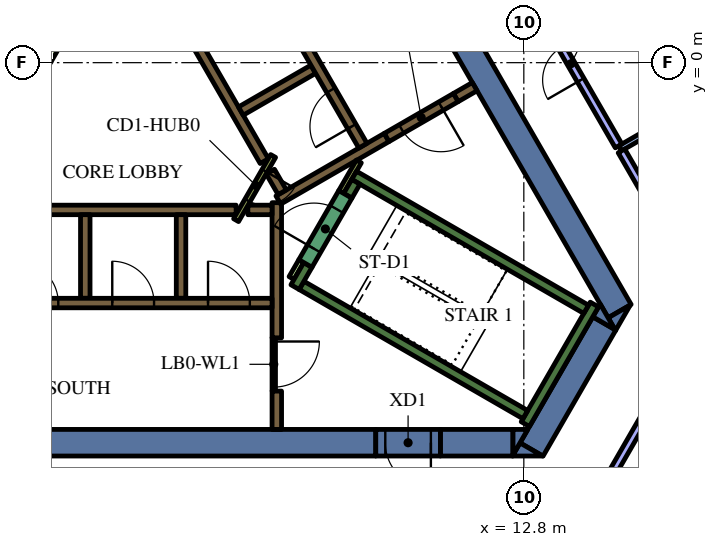
"""IFC4 building model, lengths in metres.
Left out: names, types, materials, properties, quantities, classifications, styles, units other than length and angle.
Written with IfcOpenShell. Run it as: python <this file> out.ifc"""

import sys

from ifc_helpers import new_model, si_unit, direction, frame, frame_2d, origin, place, context, subcontext, project, spatial, polyline, rectangle, outline, extrude, element, fill, save


model = new_model("IFC4")
c1 = context("Model", 3, precision=1e-05, world=origin(), true_north=direction((0.0, 1.0)))
c2 = subcontext(c1, "Body", "Model", "MODEL_VIEW")
j1 = project(units=[si_unit("LENGTHUNIT", "METRE"), si_unit("PLANEANGLEUNIT", "RADIAN")], contexts=[c1])
p1 = place(None, origin())
s1 = spatial("IfcSite", under=j1, at=p1, CompositionType="ELEMENT")
p2 = place(p1, origin())
s2 = spatial("IfcBuilding", under=s1, at=p2, CompositionType="ELEMENT")
p3 = place(p2, frame((0.0, 0.0, 226.8)))
s3 = spatial("IfcBuildingStorey", under=s2, at=p3, CompositionType="ELEMENT", Elevation=226.8)
p4 = place(p3, frame((9.085, 4.264, 0.0), z_axis=(0.0, 0.0, 1.0), x_axis=(0.499998082512, -0.866026510844, 0.0)))
e1 = element("IfcWall", 1, at=p4, inside=s3, PredefinedType="SOLIDWALL", context=c2, shape_type="SweptSolid", body=[
    extrude(rectangle(XDim=12.472, YDim=0.7, at=frame_2d((6.236, 0.0))), origin(), (0.0, 0.0, 1.0), 4.2),
])
p5 = place(p3, origin())
e2 = element("IfcWall", 2, at=p5, inside=s3, PredefinedType="SOLIDWALL", context=c2, shape_type="SweptSolid", body=[
    extrude(outline(polyline([(15.213, -7.05), (15.019, -6.714), (15.601, -6.378), (15.213, -7.05)])), origin(), (0.0, 0.0, 1.0), 4.2),
])
p6 = place(p3, frame((13.003, -10.179, 0.0), z_axis=(0.0, 0.0, 1.0), x_axis=(0.499972675833, 0.866041178825, 0.0)))
e3 = element("IfcWall", 3, at=p6, inside=s3, PredefinedType="SOLIDWALL", context=c2, shape_type="SweptSolid", body=[
    extrude(rectangle(XDim=3.829, YDim=0.7, at=frame_2d((1.915, 0.0))), origin(), (0.0, 0.0, 1.0), 4.2),
])
e4 = element("IfcWall", 4, at=p5, inside=s3, PredefinedType="SOLIDWALL", context=c2, shape_type="SweptSolid", body=[
    extrude(outline(polyline([(12.698, -10.005), (13.296, -10.35), (12.5, -10.35), (12.698, -10.005)])), origin(), (0.0, 0.0, 1.0), 4.2),
])
e5 = element("IfcWall", 5, at=p5, inside=s3, PredefinedType="SOLIDWALL", context=c2, shape_type="SweptSolid", body=[
    extrude(outline(polyline([(14.809, -6.35), (15.197, -7.022), (14.615, -6.686), (14.809, -6.35)])), origin(), (0.0, 0.0, 1.0), 4.2),
])
p7 = place(p3, frame((10.604, -10.0, 0.0), z_axis=(0.0, 0.0, 1.0), x_axis=(1.0, 0.0, 0.0)))
e6 = element("IfcWall", 6, at=p7, inside=s3, PredefinedType="SOLIDWALL", context=c2, shape_type="SweptSolid", body=[
    extrude(rectangle(XDim=1.909, YDim=0.7, at=frame_2d((0.955, 0.0))), origin(), (0.0, 0.0, 1.0), 4.2),
])
e7 = element("IfcWall", 7, at=p5, inside=s3, PredefinedType="SOLIDWALL", context=c2, shape_type="SweptSolid", body=[
    extrude(outline(polyline([(12.904, -9.65), (12.516, -10.322), (12.516, -9.65), (12.904, -9.65)])), origin(), (0.0, 0.0, 1.0), 4.2),
])
p8 = place(p3, frame((8.904, -10.0, 0.0), z_axis=(0.0, 0.0, 1.0), x_axis=(-1.0, 0.0, 0.0)))
e8 = element("IfcWall", 8, at=p8, inside=s3, PredefinedType="SOLIDWALL", context=c2, shape_type="SweptSolid", body=[
    extrude(rectangle(XDim=22.226, YDim=0.7, at=frame_2d((11.113, 0.0))), origin(), (0.0, 0.0, 1.0), 4.2),
])
p9 = place(p3, frame((12.84, -9.511, 0.0), z_axis=(0.0, 0.0, 1.0), x_axis=(0.500048121057, 0.865997619297, 0.0)))
e9 = element("IfcWall", 9, at=p9, inside=s3, PredefinedType="SOLIDWALL", context=c2, shape_type="SweptSolid", body=[
    extrude(rectangle(XDim=3.634, YDim=0.25, at=frame_2d((1.817, 0.0))), origin(), (0.0, 0.0, 1.0), 4.2),
])
p10 = place(p3, frame((12.84, -9.261, 0.0), z_axis=(0.0, 0.0, 1.0), x_axis=(-0.866013990052, 0.500019768644, 0.0)))
e10 = element("IfcWall", 10, at=p10, inside=s3, PredefinedType="SOLIDWALL", context=c2, shape_type="SweptSolid", body=[
    extrude(rectangle(XDim=6.8, YDim=0.25, at=frame_2d((3.4, 0.0))), origin(), (0.0, 0.0, 1.0), 4.2),
])
p11 = place(p3, frame((6.78, -5.906, 0.0), z_axis=(0.0, 0.0, 1.0), x_axis=(0.500223362819, 0.865896406789, 0.0)))
e11 = element("IfcWall", 11, at=p11, inside=s3, PredefinedType="SOLIDWALL", context=c2, shape_type="SweptSolid", body=[
    extrude(rectangle(XDim=0.675, YDim=0.25, at=frame_2d((0.337, 0.0))), origin(), (0.0, 0.0, 1.0), 4.2),
])
p12 = place(p3, frame((8.334, -2.964, 0.0), z_axis=(0.0, 0.0, 1.0), x_axis=(0.866016039709, -0.500016218704, 0.0)))
e12 = element("IfcWall", 12, at=p12, inside=s3, PredefinedType="SOLIDWALL", context=c2, shape_type="SweptSolid", body=[
    extrude(rectangle(XDim=7.05, YDim=0.25, at=frame_2d((3.525, 0.0))), origin(), (0.0, 0.0, 1.0), 4.2),
])
p13 = place(p3, frame((8.168, -3.503, 0.0), z_axis=(0.0, 0.0, 1.0), x_axis=(0.49972245349, 0.866185586049, 0.0)))
e13 = element("IfcWall", 13, at=p13, inside=s3, PredefinedType="SOLIDWALL", context=c2, shape_type="SweptSolid", body=[
    extrude(rectangle(XDim=0.425, YDim=0.25, at=frame_2d((0.212, 0.0))), origin(), (0.0, 0.0, 1.0), 4.2),
])
p14 = place(p3, frame((-5.259, -3.875, 0.0), z_axis=(0.0, 0.0, 1.0), x_axis=(1.0, 0.0, 0.0)))
e14 = element("IfcWall", 14, at=p14, inside=s3, PredefinedType="SOLIDWALL", context=c2, shape_type="SweptSolid", body=[
    extrude(rectangle(XDim=10.489, YDim=0.25, at=frame_2d((5.244, 0.0))), origin(), (0.0, 0.0, 1.0), 4.2),
])
for number, where, z_axis, x_axis in (
    (15, (3.78, -4.0, 0.0), (0.0, 0.0, 1.0), (0.0, -1.0, 0.0)),
    (16, (1.26, -4.0, 0.0), (0.0, 0.0, 1.0), (0.0, -1.0, 0.0)),
):
    element("IfcWall", number, at=place(p3, frame(where, z_axis=z_axis, x_axis=x_axis)), inside=s3, PredefinedType="SOLIDWALL", context=c2, shape_type="SweptSolid", body=[
        extrude(rectangle(XDim=2.2, YDim=0.25, at=frame_2d((1.1, 0.0))), origin(), (0.0, 0.0, 1.0), 4.2),
    ])
p15 = place(p3, frame((6.3, -7.24, 0.0), z_axis=(0.0, 0.0, 1.0), x_axis=(0.0, 1.0, 0.0)))
e17 = element("IfcWall", 17, at=p15, inside=s3, PredefinedType="SOLIDWALL", context=c2, shape_type="SweptSolid", body=[
    extrude(rectangle(XDim=3.556, YDim=0.25, at=frame_2d((1.778, 0.0))), origin(), (0.0, 0.0, 1.0), 4.2),
])
p16 = place(p3, frame((6.3, -9.65, 0.0), z_axis=(0.0, 0.0, 1.0), x_axis=(0.0, 1.0, 0.0)))
e18 = element("IfcWall", 18, at=p16, inside=s3, PredefinedType="SOLIDWALL", context=c2, shape_type="SweptSolid", body=[
    extrude(rectangle(XDim=1.008, YDim=0.25, at=frame_2d((0.504, 0.0))), origin(), (0.0, 0.0, 1.0), 4.2),
])
p17 = place(p3, frame((5.538, -3.875, 0.0), z_axis=(0.0, 0.0, 1.0), x_axis=(1.0, 0.0, 0.0)))
e19 = element("IfcWall", 19, at=p17, inside=s3, PredefinedType="SOLIDWALL", context=c2, shape_type="SweptSolid", body=[
    extrude(rectangle(XDim=0.637, YDim=0.25, at=frame_2d((0.318, 0.0))), origin(), (0.0, 0.0, 1.0), 4.2),
])
p18 = place(p3, frame((9.19, -1.969, 0.0), z_axis=(0.0, 0.0, 1.0), x_axis=(-0.866057109641, -0.499945079824, 0.0)))
e20 = element("IfcWall", 20, at=p18, inside=s3, PredefinedType="SOLIDWALL", context=c2, shape_type="SweptSolid", body=[
    extrude(rectangle(XDim=3.291, YDim=0.25, at=frame_2d((1.646, 0.0))), origin(), (0.0, 0.0, 1.0), 4.2),
])
p19 = place(p3, frame((6.13, -2.867, 0.0), z_axis=(0.0, 0.0, 1.0), x_axis=(0.500160776593, -0.865932559475, 0.0)))
e21 = element("IfcWall", 21, at=p19, inside=s3, PredefinedType="SOLIDWALL", context=c2, shape_type="SweptSolid", body=[
    extrude(rectangle(XDim=0.627, YDim=0.25, at=frame_2d((0.313, 0.0))), origin(), (0.0, 0.0, 1.0), 4.2),
])
p20 = place(p3, frame((11.507, -0.631, 0.0), z_axis=(0.0, 0.0, 1.0), x_axis=(-0.866093731455, -0.499881634324, 0.0)))
e22 = element("IfcWall", 22, at=p20, inside=s3, PredefinedType="SOLIDWALL", context=c2, shape_type="SweptSolid", body=[
    extrude(rectangle(XDim=0.575, YDim=0.25, at=frame_2d((0.288, 0.0))), origin(), (0.0, 0.0, 1.0), 4.2),
])
p21 = place(p3, frame((5.97, -2.591, 0.0), z_axis=(0.0, 0.0, 1.0), x_axis=(-0.499994469932, 0.866028596547, 0.0)))
e23 = element("IfcWall", 23, at=p21, inside=s3, PredefinedType="SOLIDWALL", context=c2, shape_type="SweptSolid", body=[
    extrude(rectangle(XDim=10.488, YDim=0.25, at=frame_2d((5.244, 0.0))), origin(), (0.0, 0.0, 1.0), 4.2),
])
p22 = place(p3, frame((5.354, -1.274, 0.0), z_axis=(0.0, 0.0, 1.0), x_axis=(0.866008176907, 0.50002983664, 0.0)))
e24 = element("IfcWall", 24, at=p22, inside=s3, PredefinedType="SOLIDWALL", context=c2, shape_type="SweptSolid", body=[
    extrude(rectangle(XDim=2.2, YDim=0.25, at=frame_2d((1.1, 0.0))), origin(), (0.0, 0.0, 1.0), 4.2),
])
p23 = place(p3, frame((6.945, -5.222, 0.0), z_axis=(0.0, 0.0, 1.0), x_axis=(-0.499818422106, -0.866130212453, 0.0)))
e25 = element("IfcWall", 25, at=p23, inside=s3, PredefinedType="PARTITIONING", context=c2, shape_type="SweptSolid", body=[
    extrude(rectangle(XDim=0.514, YDim=0.15, at=frame_2d((0.257, 0.0))), origin(), (0.0, 0.0, 1.0), 3.45),
])
p24 = place(p3, frame((8.459, -2.599, 0.0), z_axis=(0.0, 0.0, 1.0), x_axis=(-0.500041054325, -0.866001699761, 0.0)))
e26 = element("IfcWall", 26, at=p24, inside=s3, PredefinedType="PARTITIONING", context=c2, shape_type="SweptSolid", body=[
    extrude(rectangle(XDim=0.929, YDim=0.15, at=frame_2d((0.464, 0.0))), origin(), (0.0, 0.0, 1.0), 4.2),
])
p25 = place(p3, frame((-1.887, -3.718, 0.0), z_axis=(0.0, 0.0, 1.0), x_axis=(0.500005008002, 0.866022512394, 0.0)))
e27 = element("IfcWall", 27, at=p25, inside=s3, PredefinedType="PARTITIONING", context=c2, shape_type="SweptSolid", body=[
    extrude(rectangle(XDim=8.327, YDim=0.15, at=frame_2d((4.164, 0.0))), origin(), (0.0, 0.0, 1.0), 3.45),
])
p26 = place(p3, frame((-6.175, -6.325, 0.0), z_axis=(0.0, 0.0, 1.0), x_axis=(1.0, 0.0, 0.0)))
e28 = element("IfcWall", 28, at=p26, inside=s3, PredefinedType="SOLIDWALL", context=c2, shape_type="SweptSolid", body=[
    extrude(rectangle(XDim=12.35, YDim=0.25, at=frame_2d((6.175, 0.0))), origin(), (0.0, 0.0, 1.0), 4.2),
])
p27 = place(p26, frame((0.585, 0.0, 0.0)))
e29 = element("IfcOpeningElement", 29, at=p27, cuts=e28, PredefinedType="OPENING", context=c2, shape_type="SweptSolid", body=[
    extrude(rectangle(XDim=1.1, YDim=2.1, at=frame_2d((0.55, 1.05))), frame((0.0, 0.135, 0.0), z_axis=(0.0, -1.0, 0.0), x_axis=(1.0, 0.0, 0.0)), (0.0, 0.0, 1.0), 0.27),
])
p28 = place(p26, frame((3.105, 0.0, 0.0)))
e30 = element("IfcOpeningElement", 30, at=p28, cuts=e28, PredefinedType="OPENING", context=c2, shape_type="SweptSolid", body=[
    extrude(rectangle(XDim=1.1, YDim=2.1, at=frame_2d((0.55, 1.05))), frame((0.0, 0.135, 0.0), z_axis=(0.0, -1.0, 0.0), x_axis=(1.0, 0.0, 0.0)), (0.0, 0.0, 1.0), 0.27),
])
p29 = place(p26, frame((5.625, 0.0, 0.0)))
e31 = element("IfcOpeningElement", 31, at=p29, cuts=e28, PredefinedType="OPENING", context=c2, shape_type="SweptSolid", body=[
    extrude(rectangle(XDim=1.1, YDim=2.1, at=frame_2d((0.55, 1.05))), frame((0.0, 0.135, 0.0), z_axis=(0.0, -1.0, 0.0), x_axis=(1.0, 0.0, 0.0)), (0.0, 0.0, 1.0), 0.27),
])
p30 = place(p26, frame((8.145, 0.0, 0.0)))
e32 = element("IfcOpeningElement", 32, at=p30, cuts=e28, PredefinedType="OPENING", context=c2, shape_type="SweptSolid", body=[
    extrude(rectangle(XDim=1.1, YDim=2.1, at=frame_2d((0.55, 1.05))), frame((0.0, 0.135, 0.0), z_axis=(0.0, -1.0, 0.0), x_axis=(1.0, 0.0, 0.0)), (0.0, 0.0, 1.0), 0.27),
])
p31 = place(p26, frame((10.665, 0.0, 0.0)))
e33 = element("IfcOpeningElement", 33, at=p31, cuts=e28, PredefinedType="OPENING", context=c2, shape_type="SweptSolid", body=[
    extrude(rectangle(XDim=1.1, YDim=2.1, at=frame_2d((0.55, 1.05))), frame((0.0, 0.135, 0.0), z_axis=(0.0, -1.0, 0.0), x_axis=(1.0, 0.0, 0.0)), (0.0, 0.0, 1.0), 0.27),
])
p32 = place(p3, frame((8.565, -2.185, 0.0), z_axis=(0.0, 0.0, 1.0), x_axis=(-0.499997954832, 0.866026584559, 0.0)))
e34 = element("IfcWall", 34, at=p32, inside=s3, PredefinedType="SOLIDWALL", context=c2, shape_type="SweptSolid", body=[
    extrude(rectangle(XDim=12.35, YDim=0.25, at=frame_2d((6.175, 0.0))), origin(), (0.0, 0.0, 1.0), 4.2),
])
p33 = place(p32, frame((0.585, 0.0, 0.0)))
e35 = element("IfcOpeningElement", 35, at=p33, cuts=e34, PredefinedType="OPENING", context=c2, shape_type="SweptSolid", body=[
    extrude(rectangle(XDim=1.1, YDim=2.1, at=frame_2d((0.55, 1.05))), frame((0.0, 0.135, 0.0), z_axis=(0.0, -1.0, 0.0), x_axis=(1.0, 0.0, 0.0)), (0.0, 0.0, 1.0), 0.27),
])
p34 = place(p3, frame((7.053, -5.284, 0.0), z_axis=(0.0, 0.0, 1.0), x_axis=(0.500078061341, 0.865980330357, 0.0)))
e36 = element("IfcWall", 36, at=p34, inside=s3, PredefinedType="SOLIDWALL", context=c2, shape_type="SweptSolid", body=[
    extrude(rectangle(XDim=2.1, YDim=0.4, at=frame_2d((1.05, 0.0))), origin(), (0.0, 0.0, 1.0), 4.2),
])
p35 = place(p34, frame((0.45, 0.0, 0.0)))
e37 = element("IfcOpeningElement", 37, at=p35, cuts=e36, PredefinedType="OPENING", context=c2, shape_type="SweptSolid", body=[
    extrude(rectangle(XDim=1.2, YDim=2.1, at=frame_2d((0.6, 1.05))), frame((0.0, 0.21, 0.0), z_axis=(0.0, -1.0, 0.0), x_axis=(1.0, 0.0, 0.0)), (0.0, 0.0, 1.0), 0.42),
])
p36 = place(p3, frame((6.203, -2.456, 0.0), z_axis=(0.0, 0.0, 1.0), x_axis=(-0.500043961785, -0.866000020948, 0.0)))
e38 = element("IfcWall", 38, at=p36, inside=s3, PredefinedType="PARTITIONING", context=c2, shape_type="SweptSolid", body=[
    extrude(rectangle(XDim=1.95, YDim=0.15, at=frame_2d((0.975, 0.0))), origin(), (0.0, 0.0, 1.0), 4.2),
])
p37 = place(p36, frame((0.45, 0.0, 0.0)))
e39 = element("IfcOpeningElement", 39, at=p37, cuts=e38, PredefinedType="OPENING", context=c2, shape_type="SweptSolid", body=[
    extrude(rectangle(XDim=0.9, YDim=2.1, at=frame_2d((0.45, 1.05))), frame((0.0, 0.085, 0.0), z_axis=(0.0, -1.0, 0.0), x_axis=(1.0, 0.0, 0.0)), (0.0, 0.0, 1.0), 0.17),
])
p38 = place(p3, frame((6.22, -7.237, 0.0), z_axis=(0.0, 0.0, 1.0), x_axis=(0.0, -1.0, 0.0)))
e40 = element("IfcWall", 40, at=p38, inside=s3, PredefinedType="PARTITIONING", context=c2, shape_type="SweptSolid", body=[
    extrude(rectangle(XDim=1.4, YDim=0.09, at=frame_2d((0.7, 0.0))), origin(), (0.0, 0.0, 1.0), 3.45),
])
p39 = place(p38, frame((0.1, 0.0, 0.0)))
e41 = element("IfcOpeningElement", 41, at=p39, cuts=e40, PredefinedType="OPENING", context=c2, shape_type="SweptSolid", body=[
    extrude(rectangle(XDim=1.2, YDim=2.1, at=frame_2d((0.6, 1.05))), frame((0.0, 0.055, 0.0), z_axis=(0.0, -1.0, 0.0), x_axis=(1.0, 0.0, 0.0)), (0.0, 0.0, 1.0), 0.11),
])
p40 = place(p3, frame((11.009, -0.919, 0.0), z_axis=(0.0, 0.0, 1.0), x_axis=(-0.866059744384, -0.49994051562, 0.0)))
e42 = element("IfcWall", 42, at=p40, inside=s3, PredefinedType="SOLIDWALL", context=c2, shape_type="SweptSolid", body=[
    extrude(rectangle(XDim=2.1, YDim=0.25, at=frame_2d((1.05, 0.0))), origin(), (0.0, 0.0, 1.0), 4.2),
])
p41 = place(p40, frame((0.45, 0.0, 0.0)))
e43 = element("IfcOpeningElement", 43, at=p41, cuts=e42, PredefinedType="OPENING", context=c2, shape_type="SweptSolid", body=[
    extrude(rectangle(XDim=1.2, YDim=2.1, at=frame_2d((0.6, 1.05))), frame((0.0, 0.135, 0.0), z_axis=(0.0, -1.0, 0.0), x_axis=(1.0, 0.0, 0.0)), (0.0, 0.0, 1.0), 0.27),
])
p42 = place(p3, frame((10.604, -10.0, 0.0), z_axis=(0.0, 0.0, 1.0), x_axis=(-1.0, 0.0, 0.0)))
e44 = element("IfcWall", 44, at=p42, inside=s3, PredefinedType="SOLIDWALL", context=c2, shape_type="SweptSolid", body=[
    extrude(rectangle(XDim=1.7, YDim=0.7, at=frame_2d((0.85, 0.0))), origin(), (0.0, 0.0, 1.0), 4.2),
])
p43 = place(p42, frame((0.25, 0.0, 0.0)))
e45 = element("IfcOpeningElement", 45, at=p43, cuts=e44, PredefinedType="OPENING", context=c2, shape_type="SweptSolid", body=[
    extrude(rectangle(XDim=1.2, YDim=2.1, at=frame_2d((0.6, 1.05))), frame((0.0, 0.36, 0.0), z_axis=(0.0, -1.0, 0.0), x_axis=(1.0, 0.0, 0.0)), (0.0, 0.0, 1.0), 0.72),
])
p44 = place(p3, frame((14.362, -12.124, 0.0), z_axis=(0.0, 0.0, 1.0), x_axis=(0.500017005442, 0.866015585465, 0.0)))
e46 = element("IfcWall", 46, at=p44, inside=s3, PredefinedType="PARTITIONING", context=c2, shape_type="SweptSolid", body=[
    extrude(rectangle(XDim=6.338, YDim=0.2, at=frame_2d((3.169, 0.0))), origin(), (0.0, 0.0, 1.0), 3.45),
])
p45 = place(p3, frame((18.367, -0.504, 0.0), z_axis=(0.0, 0.0, 1.0), x_axis=(-0.866056812483, -0.499945594592, 0.0)))
e47 = element("IfcWall", 47, at=p45, inside=s3, PredefinedType="PARTITIONING", context=c2, shape_type="SweptSolid", body=[
    extrude(rectangle(XDim=3.504, YDim=0.15, at=frame_2d((1.752, 0.0))), origin(), (0.0, 0.0, 1.0), 3.45),
])
p46 = place(p45, frame((1.304, 0.0, 0.0)))
e48 = element("IfcOpeningElement", 48, at=p46, cuts=e47, PredefinedType="OPENING", context=c2, shape_type="SweptSolid", body=[
    extrude(rectangle(XDim=0.9, YDim=2.1, at=frame_2d((0.45, 1.05))), frame((0.0, 0.085, 0.0), z_axis=(0.0, -1.0, 0.0), x_axis=(1.0, 0.0, 0.0)), (0.0, 0.0, 1.0), 0.17),
])
p47 = place(p3, frame((17.696, -6.35, 0.0), z_axis=(0.0, 0.0, 1.0), x_axis=(-0.499976825411, 0.866038783226, 0.0)))
e49 = element("IfcWall", 49, at=p47, inside=s3, PredefinedType="PARTITIONING", context=c2, shape_type="SweptSolid", body=[
    extrude(rectangle(XDim=4.653, YDim=0.2, at=frame_2d((2.326, 0.0))), origin(), (0.0, 0.0, 1.0), 3.45),
])
p48 = place(p3, frame((15.295, -2.191, 0.0), z_axis=(0.0, 0.0, 1.0), x_axis=(-0.500039923732, 0.86600235258, 0.0)))
e50 = element("IfcWall", 50, at=p48, inside=s3, PredefinedType="PARTITIONING", context=c2, shape_type="SweptSolid", body=[
    extrude(rectangle(XDim=5.015, YDim=0.2, at=frame_2d((2.507, 0.0))), origin(), (0.0, 0.0, 1.0), 3.45),
])
p49 = place(p48, frame((2.0, 0.0, 0.0)))
e51 = element("IfcOpeningElement", 51, at=p49, cuts=e50, PredefinedType="OPENING", context=c2, shape_type="SweptSolid", body=[
    extrude(rectangle(XDim=1.0, YDim=2.1, at=frame_2d((0.5, 1.05))), frame((0.0, 0.11, 0.0), z_axis=(0.0, -1.0, 0.0), x_axis=(1.0, 0.0, 0.0)), (0.0, 0.0, 1.0), 0.22),
])
p50 = place(p29, origin())
e52 = element("IfcDoor", 52, at=p50, inside=s3, OperationType="DOUBLE_DOOR_SLIDING", PredefinedType="DOOR", context=c2, shape_type="SweptSolid", body=[
    extrude(rectangle(XDim=1.1, YDim=2.1, at=frame_2d((0.55, 1.05))), frame((0.0, 0.025, 0.0), z_axis=(0.0, -1.0, 0.0), x_axis=(1.0, 0.0, 0.0)), (0.0, 0.0, 1.0), 0.05),
])
fill(e31, e52)
p51 = place(p30, origin())
e53 = element("IfcDoor", 53, at=p51, inside=s3, OperationType="DOUBLE_DOOR_SLIDING", PredefinedType="DOOR", context=c2, shape_type="SweptSolid", body=[
    extrude(rectangle(XDim=1.1, YDim=2.1, at=frame_2d((0.55, 1.05))), frame((0.0, 0.025, 0.0), z_axis=(0.0, -1.0, 0.0), x_axis=(1.0, 0.0, 0.0)), (0.0, 0.0, 1.0), 0.05),
])
fill(e32, e53)
p52 = place(p31, origin())
e54 = element("IfcDoor", 54, at=p52, inside=s3, OperationType="DOUBLE_DOOR_SLIDING", PredefinedType="DOOR", context=c2, shape_type="SweptSolid", body=[
    extrude(rectangle(XDim=1.1, YDim=2.1, at=frame_2d((0.55, 1.05))), frame((0.0, 0.025, 0.0), z_axis=(0.0, -1.0, 0.0), x_axis=(1.0, 0.0, 0.0)), (0.0, 0.0, 1.0), 0.05),
])
fill(e33, e54)
p53 = place(p33, origin())
e55 = element("IfcDoor", 55, at=p53, inside=s3, OperationType="DOUBLE_DOOR_SLIDING", PredefinedType="DOOR", context=c2, shape_type="SweptSolid", body=[
    extrude(rectangle(XDim=1.1, YDim=2.1, at=frame_2d((0.55, 1.05))), frame((0.0, 0.025, 0.0), z_axis=(0.0, -1.0, 0.0), x_axis=(1.0, 0.0, 0.0)), (0.0, 0.0, 1.0), 0.05),
])
fill(e35, e55)
p54 = place(p35, origin())
e56 = element("IfcDoor", 56, at=p54, inside=s3, OperationType="SINGLE_SWING_LEFT", PredefinedType="DOOR", context=c2, shape_type="SweptSolid", body=[
    extrude(rectangle(XDim=1.2, YDim=2.1, at=frame_2d((0.6, 1.05))), frame((0.0, 0.025, 0.0), z_axis=(0.0, -1.0, 0.0), x_axis=(1.0, 0.0, 0.0)), (0.0, 0.0, 1.0), 0.05),
])
fill(e37, e56)
p55 = place(p37, origin())
e57 = element("IfcDoor", 57, at=p55, inside=s3, OperationType="SINGLE_SWING_LEFT", PredefinedType="DOOR", context=c2, shape_type="SweptSolid", body=[
    extrude(rectangle(XDim=0.9, YDim=2.1, at=frame_2d((0.45, 1.05))), frame((0.0, 0.025, 0.0), z_axis=(0.0, -1.0, 0.0), x_axis=(1.0, 0.0, 0.0)), (0.0, 0.0, 1.0), 0.05),
])
fill(e39, e57)
p56 = place(p39, origin())
e58 = element("IfcDoor", 58, at=p56, inside=s3, OperationType="SINGLE_SWING_LEFT", PredefinedType="DOOR", context=c2, shape_type="SweptSolid", body=[
    extrude(rectangle(XDim=1.2, YDim=2.1, at=frame_2d((0.6, 1.05))), frame((0.0, 0.025, 0.0), z_axis=(0.0, -1.0, 0.0), x_axis=(1.0, 0.0, 0.0)), (0.0, 0.0, 1.0), 0.05),
])
fill(e41, e58)
p57 = place(p41, origin())
e59 = element("IfcDoor", 59, at=p57, inside=s3, OperationType="SINGLE_SWING_LEFT", PredefinedType="DOOR", context=c2, shape_type="SweptSolid", body=[
    extrude(rectangle(XDim=1.2, YDim=2.1, at=frame_2d((0.6, 1.05))), frame((0.0, 0.025, 0.0), z_axis=(0.0, -1.0, 0.0), x_axis=(1.0, 0.0, 0.0)), (0.0, 0.0, 1.0), 0.05),
])
fill(e43, e59)
p58 = place(p43, origin())
e60 = element("IfcDoor", 60, at=p58, inside=s3, OperationType="SINGLE_SWING_LEFT", PredefinedType="DOOR", context=c2, shape_type="SweptSolid", body=[
    extrude(rectangle(XDim=1.2, YDim=2.1, at=frame_2d((0.6, 1.05))), frame((0.0, 0.025, 0.0), z_axis=(0.0, -1.0, 0.0), x_axis=(1.0, 0.0, 0.0)), (0.0, 0.0, 1.0), 0.05),
])
fill(e45, e60)
p59 = place(p49, origin())
e61 = element("IfcDoor", 61, at=p59, inside=s3, OperationType="SINGLE_SWING_LEFT", PredefinedType="DOOR", context=c2, shape_type="SweptSolid", body=[
    extrude(rectangle(XDim=1.0, YDim=2.1, at=frame_2d((0.5, 1.05))), frame((0.0, 0.025, 0.0), z_axis=(0.0, -1.0, 0.0), x_axis=(1.0, 0.0, 0.0)), (0.0, 0.0, 1.0), 0.05),
])
fill(e51, e61)
save(model, sys.argv[1])
